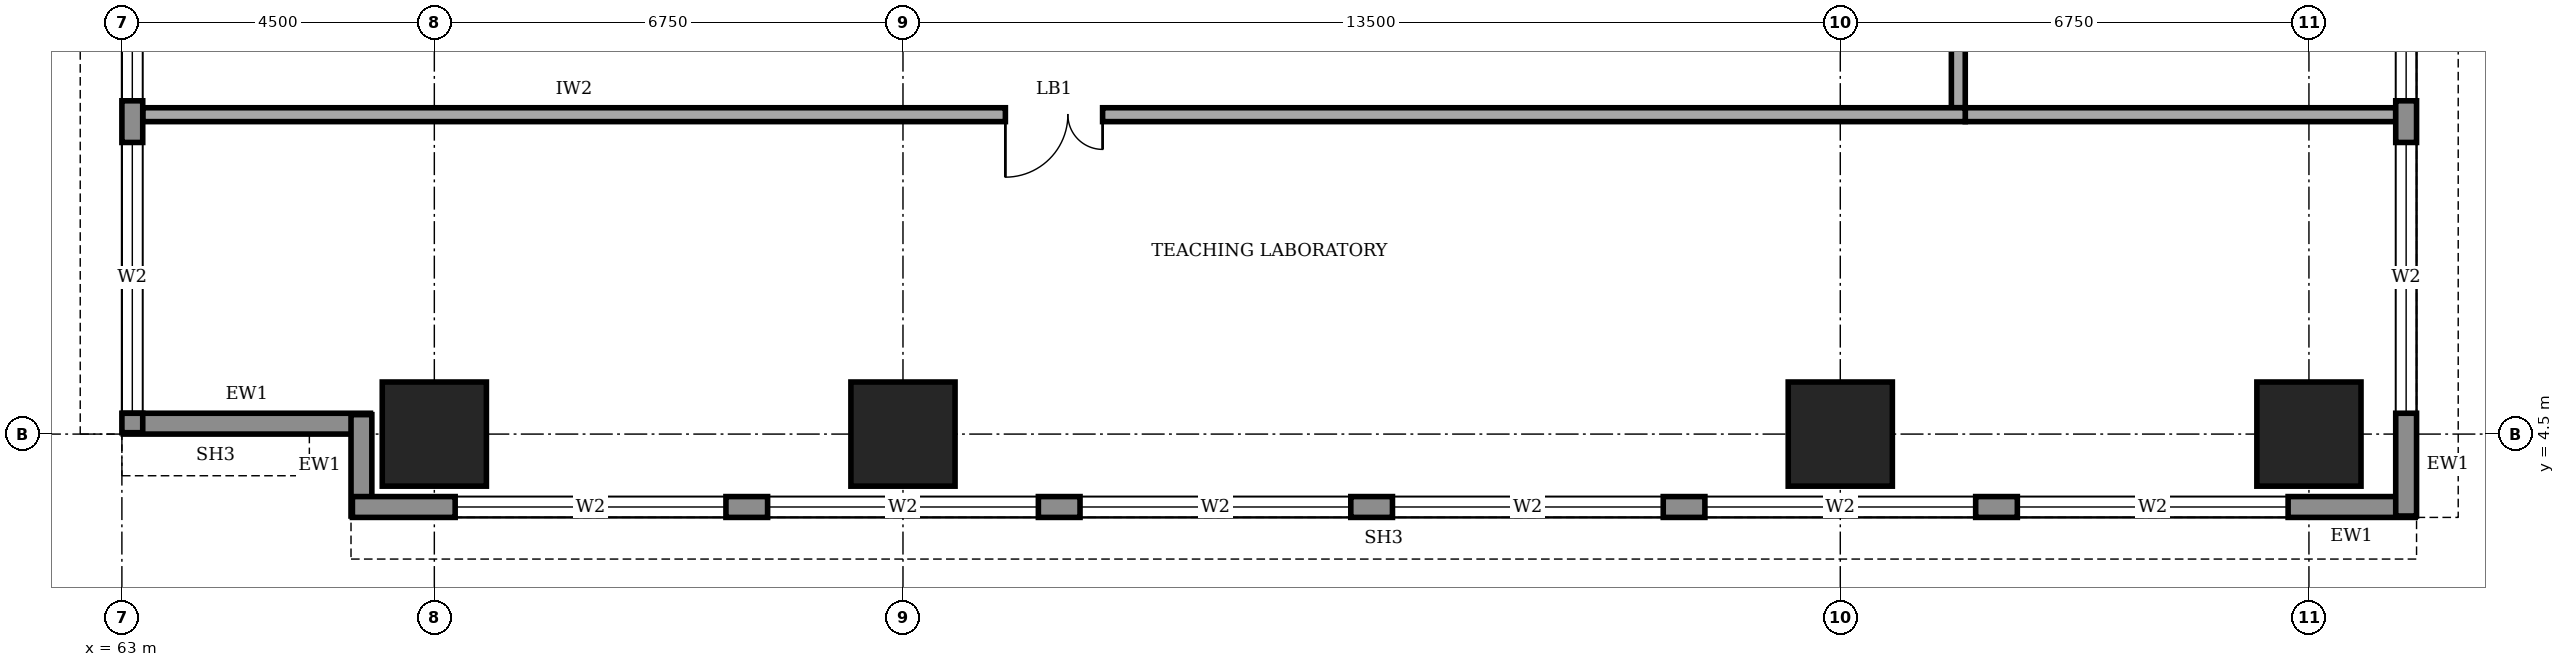
"""IFC4 building model, lengths in metres.
Left out: names, types, materials, properties, quantities, classifications, styles, units other than length and angle.
Written with IfcOpenShell. Run it as: python <this file> out.ifc"""

import sys

from ifc_helpers import new_model, si_unit, direction, frame, frame_2d, origin, origin_2d, place, context, subcontext, project, spatial, rectangle, extrude, element, fill, save


model = new_model("IFC4")
c1 = context("Model", 3, precision=1e-05, world=origin(), true_north=direction((0.0, 1.0)))
c2 = subcontext(c1, "Body", "Model", "MODEL_VIEW")
j1 = project(units=[si_unit("LENGTHUNIT", "METRE"), si_unit("PLANEANGLEUNIT", "RADIAN")], contexts=[c1])
p1 = place(None, origin())
s1 = spatial("IfcSite", under=j1, at=p1, CompositionType="ELEMENT")
p2 = place(p1, origin())
s2 = spatial("IfcBuilding", under=s1, at=p2, CompositionType="ELEMENT")
p3 = place(p2, frame((0.0, 0.0, 161.0)))
s3 = spatial("IfcBuildingStorey", under=s2, at=p3, CompositionType="ELEMENT", Elevation=161.0)
for number, where, z_axis, x_axis in (
    (1, (67.5, 4.5, 0.0), (0.0, 0.0, 1.0), (1.0, 0.0, 0.0)),
    (2, (74.25, 4.5, 0.0), (0.0, 0.0, 1.0), (1.0, 0.0, 0.0)),
    (3, (87.75, 4.5, 0.0), (0.0, 0.0, 1.0), (1.0, 0.0, 0.0)),
    (4, (94.5, 4.5, 0.0), (0.0, 0.0, 1.0), (1.0, 0.0, 0.0)),
):
    element("IfcColumn", number, at=place(p3, frame(where, z_axis=z_axis, x_axis=x_axis)), inside=s3, PredefinedType="COLUMN", context=c2, shape_type="SweptSolid", body=[
        extrude(rectangle(XDim=1.5, YDim=1.5, at=origin_2d()), origin(), (0.0, 0.0, 1.0), 4.0),
    ])
p4 = place(p3, frame((63.02, 4.65, 0.0), z_axis=(0.0, 0.0, 1.0), x_axis=(1.0, 0.0, 0.0)))
e5 = element("IfcWall", 5, at=p4, inside=s3, PredefinedType="STANDARD", context=c2, shape_type="SweptSolid", body=[
    extrude(rectangle(XDim=3.56, YDim=0.3, at=frame_2d((1.78, 0.0))), origin(), (0.0, 0.0, 1.0), 2.85),
])
p5 = place(p3, frame((66.45, 4.78, 0.0), z_axis=(0.0, 0.0, 1.0), x_axis=(0.0, -1.0, 0.0)))
e6 = element("IfcWall", 6, at=p5, inside=s3, PredefinedType="STANDARD", context=c2, shape_type="SweptSolid", body=[
    extrude(rectangle(XDim=1.46, YDim=0.3, at=frame_2d((0.73, 0.0))), origin(), (0.0, 0.0, 1.0), 3.75),
])
p6 = place(p3, frame((66.32, 3.45, 0.0), z_axis=(0.0, 0.0, 1.0), x_axis=(1.0, 0.0, 0.0)))
e7 = element("IfcWall", 7, at=p6, inside=s3, PredefinedType="STANDARD", context=c2, shape_type="SweptSolid", body=[
    extrude(rectangle(XDim=29.71, YDim=0.3, at=frame_2d((14.855, 0.0))), origin(), (0.0, 0.0, 1.0), 3.75),
])
p7 = place(p6, frame((1.48, 0.0, 0.6)))
e8 = element("IfcOpeningElement", 8, at=p7, cuts=e7, PredefinedType="OPENING", context=c2, shape_type="SweptSolid", body=[
    extrude(rectangle(XDim=3.9, YDim=2.6, at=frame_2d((1.95, 1.3))), frame((0.0, 0.16, 0.0), z_axis=(0.0, -1.0, 0.0), x_axis=(1.0, 0.0, 0.0)), (0.0, 0.0, 1.0), 0.32),
])
p8 = place(p6, frame((5.98, 0.0, 0.6)))
e9 = element("IfcOpeningElement", 9, at=p8, cuts=e7, PredefinedType="OPENING", context=c2, shape_type="SweptSolid", body=[
    extrude(rectangle(XDim=3.9, YDim=2.6, at=frame_2d((1.95, 1.3))), frame((0.0, 0.16, 0.0), z_axis=(0.0, -1.0, 0.0), x_axis=(1.0, 0.0, 0.0)), (0.0, 0.0, 1.0), 0.32),
])
p9 = place(p6, frame((10.48, 0.0, 0.6)))
e10 = element("IfcOpeningElement", 10, at=p9, cuts=e7, PredefinedType="OPENING", context=c2, shape_type="SweptSolid", body=[
    extrude(rectangle(XDim=3.9, YDim=2.6, at=frame_2d((1.95, 1.3))), frame((0.0, 0.16, 0.0), z_axis=(0.0, -1.0, 0.0), x_axis=(1.0, 0.0, 0.0)), (0.0, 0.0, 1.0), 0.32),
])
p10 = place(p6, frame((14.98, 0.0, 0.6)))
e11 = element("IfcOpeningElement", 11, at=p10, cuts=e7, PredefinedType="OPENING", context=c2, shape_type="SweptSolid", body=[
    extrude(rectangle(XDim=3.9, YDim=2.6, at=frame_2d((1.95, 1.3))), frame((0.0, 0.16, 0.0), z_axis=(0.0, -1.0, 0.0), x_axis=(1.0, 0.0, 0.0)), (0.0, 0.0, 1.0), 0.32),
])
p11 = place(p6, frame((19.48, 0.0, 0.6)))
e12 = element("IfcOpeningElement", 12, at=p11, cuts=e7, PredefinedType="OPENING", context=c2, shape_type="SweptSolid", body=[
    extrude(rectangle(XDim=3.9, YDim=2.6, at=frame_2d((1.95, 1.3))), frame((0.0, 0.16, 0.0), z_axis=(0.0, -1.0, 0.0), x_axis=(1.0, 0.0, 0.0)), (0.0, 0.0, 1.0), 0.32),
])
p12 = place(p6, frame((23.98, 0.0, 0.6)))
e13 = element("IfcOpeningElement", 13, at=p12, cuts=e7, PredefinedType="OPENING", context=c2, shape_type="SweptSolid", body=[
    extrude(rectangle(XDim=3.9, YDim=2.6, at=frame_2d((1.95, 1.3))), frame((0.0, 0.16, 0.0), z_axis=(0.0, -1.0, 0.0), x_axis=(1.0, 0.0, 0.0)), (0.0, 0.0, 1.0), 0.32),
])
p13 = place(p3, frame((95.9, 3.32, 0.0), z_axis=(0.0, 0.0, 1.0), x_axis=(0.0, 1.0, 0.0)))
e14 = element("IfcWall", 14, at=p13, inside=s3, PredefinedType="STANDARD", context=c2, shape_type="SweptSolid", body=[
    extrude(rectangle(XDim=33.86, YDim=0.3, at=frame_2d((16.93, 0.0))), origin(), (0.0, 0.0, 1.0), 3.75),
])
p14 = place(p13, frame((1.48, 0.0, 0.6)))
e15 = element("IfcOpeningElement", 15, at=p14, cuts=e14, PredefinedType="OPENING", context=c2, shape_type="SweptSolid", body=[
    extrude(rectangle(XDim=3.9, YDim=2.6, at=frame_2d((1.95, 1.3))), frame((0.0, 0.16, 0.0), z_axis=(0.0, -1.0, 0.0), x_axis=(1.0, 0.0, 0.0)), (0.0, 0.0, 1.0), 0.32),
])
p15 = place(p13, frame((5.98, 0.0, 0.6)))
e16 = element("IfcOpeningElement", 16, at=p15, cuts=e14, PredefinedType="OPENING", context=c2, shape_type="SweptSolid", body=[
    extrude(rectangle(XDim=3.9, YDim=2.6, at=frame_2d((1.95, 1.3))), frame((0.0, 0.16, 0.0), z_axis=(0.0, -1.0, 0.0), x_axis=(1.0, 0.0, 0.0)), (0.0, 0.0, 1.0), 0.32),
])
p16 = place(p13, frame((10.48, 0.0, 0.6)))
e17 = element("IfcOpeningElement", 17, at=p16, cuts=e14, PredefinedType="OPENING", context=c2, shape_type="SweptSolid", body=[
    extrude(rectangle(XDim=3.9, YDim=2.6, at=frame_2d((1.95, 1.3))), frame((0.0, 0.16, 0.0), z_axis=(0.0, -1.0, 0.0), x_axis=(1.0, 0.0, 0.0)), (0.0, 0.0, 1.0), 0.32),
])
p17 = place(p13, frame((14.98, 0.0, 0.6)))
e18 = element("IfcOpeningElement", 18, at=p17, cuts=e14, PredefinedType="OPENING", context=c2, shape_type="SweptSolid", body=[
    extrude(rectangle(XDim=3.9, YDim=2.6, at=frame_2d((1.95, 1.3))), frame((0.0, 0.16, 0.0), z_axis=(0.0, -1.0, 0.0), x_axis=(1.0, 0.0, 0.0)), (0.0, 0.0, 1.0), 0.32),
])
p18 = place(p13, frame((19.48, 0.0, 0.6)))
e19 = element("IfcOpeningElement", 19, at=p18, cuts=e14, PredefinedType="OPENING", context=c2, shape_type="SweptSolid", body=[
    extrude(rectangle(XDim=3.9, YDim=2.6, at=frame_2d((1.95, 1.3))), frame((0.0, 0.16, 0.0), z_axis=(0.0, -1.0, 0.0), x_axis=(1.0, 0.0, 0.0)), (0.0, 0.0, 1.0), 0.32),
])
p19 = place(p13, frame((23.98, 0.0, 0.6)))
e20 = element("IfcOpeningElement", 20, at=p19, cuts=e14, PredefinedType="OPENING", context=c2, shape_type="SweptSolid", body=[
    extrude(rectangle(XDim=3.9, YDim=2.6, at=frame_2d((1.95, 1.3))), frame((0.0, 0.16, 0.0), z_axis=(0.0, -1.0, 0.0), x_axis=(1.0, 0.0, 0.0)), (0.0, 0.0, 1.0), 0.32),
])
p20 = place(p13, frame((28.48, 0.0, 0.6)))
e21 = element("IfcOpeningElement", 21, at=p20, cuts=e14, PredefinedType="OPENING", context=c2, shape_type="SweptSolid", body=[
    extrude(rectangle(XDim=3.9, YDim=2.6, at=frame_2d((1.95, 1.3))), frame((0.0, 0.16, 0.0), z_axis=(0.0, -1.0, 0.0), x_axis=(1.0, 0.0, 0.0)), (0.0, 0.0, 1.0), 0.32),
])
p21 = place(p3, frame((63.15, 35.98, 0.0), z_axis=(0.0, 0.0, 1.0), x_axis=(0.0, -1.0, 0.0)))
e22 = element("IfcWall", 22, at=p21, inside=s3, PredefinedType="STANDARD", context=c2, shape_type="SweptSolid", body=[
    extrude(rectangle(XDim=31.46, YDim=0.3, at=frame_2d((15.73, 0.0))), origin(), (0.0, 0.0, 1.0), 3.75),
])
p22 = place(p21, frame((27.28, 0.0, 0.6)))
e23 = element("IfcOpeningElement", 23, at=p22, cuts=e22, PredefinedType="OPENING", context=c2, shape_type="SweptSolid", body=[
    extrude(rectangle(XDim=3.9, YDim=2.6, at=frame_2d((1.95, 1.3))), frame((0.0, 0.16, 0.0), z_axis=(0.0, -1.0, 0.0), x_axis=(1.0, 0.0, 0.0)), (0.0, 0.0, 1.0), 0.32),
])
p23 = place(p21, frame((22.78, 0.0, 0.6)))
e24 = element("IfcOpeningElement", 24, at=p23, cuts=e22, PredefinedType="OPENING", context=c2, shape_type="SweptSolid", body=[
    extrude(rectangle(XDim=3.9, YDim=2.6, at=frame_2d((1.95, 1.3))), frame((0.0, 0.16, 0.0), z_axis=(0.0, -1.0, 0.0), x_axis=(1.0, 0.0, 0.0)), (0.0, 0.0, 1.0), 0.32),
])
p24 = place(p21, frame((18.28, 0.0, 0.6)))
e25 = element("IfcOpeningElement", 25, at=p24, cuts=e22, PredefinedType="OPENING", context=c2, shape_type="SweptSolid", body=[
    extrude(rectangle(XDim=3.9, YDim=2.6, at=frame_2d((1.95, 1.3))), frame((0.0, 0.16, 0.0), z_axis=(0.0, -1.0, 0.0), x_axis=(1.0, 0.0, 0.0)), (0.0, 0.0, 1.0), 0.32),
])
p25 = place(p21, frame((13.78, 0.0, 0.6)))
e26 = element("IfcOpeningElement", 26, at=p25, cuts=e22, PredefinedType="OPENING", context=c2, shape_type="SweptSolid", body=[
    extrude(rectangle(XDim=3.9, YDim=2.6, at=frame_2d((1.95, 1.3))), frame((0.0, 0.16, 0.0), z_axis=(0.0, -1.0, 0.0), x_axis=(1.0, 0.0, 0.0)), (0.0, 0.0, 1.0), 0.32),
])
p26 = place(p21, frame((9.28, 0.0, 0.6)))
e27 = element("IfcOpeningElement", 27, at=p26, cuts=e22, PredefinedType="OPENING", context=c2, shape_type="SweptSolid", body=[
    extrude(rectangle(XDim=3.9, YDim=2.6, at=frame_2d((1.95, 1.3))), frame((0.0, 0.16, 0.0), z_axis=(0.0, -1.0, 0.0), x_axis=(1.0, 0.0, 0.0)), (0.0, 0.0, 1.0), 0.32),
])
p27 = place(p21, frame((4.78, 0.0, 0.6)))
e28 = element("IfcOpeningElement", 28, at=p27, cuts=e22, PredefinedType="OPENING", context=c2, shape_type="SweptSolid", body=[
    extrude(rectangle(XDim=3.9, YDim=2.6, at=frame_2d((1.95, 1.3))), frame((0.0, 0.16, 0.0), z_axis=(0.0, -1.0, 0.0), x_axis=(1.0, 0.0, 0.0)), (0.0, 0.0, 1.0), 0.32),
])
p28 = place(p3, frame((63.3, 9.1, 0.0), z_axis=(0.0, 0.0, 1.0), x_axis=(1.0, 0.0, 0.0)))
e29 = element("IfcWall", 29, at=p28, inside=s3, PredefinedType="SOLIDWALL", context=c2, shape_type="SweptSolid", body=[
    extrude(rectangle(XDim=26.25, YDim=0.2, at=frame_2d((13.125, 0.0))), origin(), (0.0, 0.0, 1.0), 3.75),
])
p29 = place(p28, frame((12.425, 0.0, 0.0)))
e30 = element("IfcOpeningElement", 30, at=p29, cuts=e29, PredefinedType="OPENING", context=c2, shape_type="SweptSolid", body=[
    extrude(rectangle(XDim=1.4, YDim=2.1, at=frame_2d((0.7, 1.05))), frame((0.0, 0.11, 0.0), z_axis=(0.0, -1.0, 0.0), x_axis=(1.0, 0.0, 0.0)), (0.0, 0.0, 1.0), 0.22),
])
p30 = place(p3, frame((89.45, 9.2, 0.0), z_axis=(0.0, 0.0, 1.0), x_axis=(0.0, 1.0, 0.0)))
e31 = element("IfcWall", 31, at=p30, inside=s3, PredefinedType="SOLIDWALL", context=c2, shape_type="SweptSolid", body=[
    extrude(rectangle(XDim=23.05, YDim=0.2, at=frame_2d((11.525, 0.0))), origin(), (0.0, 0.0, 1.0), 3.75),
])
p31 = place(p30, frame((1.55, 0.0, 0.0)))
e32 = element("IfcOpeningElement", 32, at=p31, cuts=e31, PredefinedType="OPENING", context=c2, shape_type="SweptSolid", body=[
    extrude(rectangle(XDim=1.0, YDim=2.1, at=frame_2d((0.5, 1.05))), frame((0.0, 0.11, 0.0), z_axis=(0.0, -1.0, 0.0), x_axis=(1.0, 0.0, 0.0)), (0.0, 0.0, 1.0), 0.22),
])
p32 = place(p30, frame((5.75, 0.0, 0.0)))
e33 = element("IfcOpeningElement", 33, at=p32, cuts=e31, PredefinedType="OPENING", context=c2, shape_type="SweptSolid", body=[
    extrude(rectangle(XDim=0.9, YDim=2.1, at=frame_2d((0.45, 1.05))), frame((0.0, 0.11, 0.0), z_axis=(0.0, -1.0, 0.0), x_axis=(1.0, 0.0, 0.0)), (0.0, 0.0, 1.0), 0.22),
])
p33 = place(p30, frame((8.75, 0.0, 0.0)))
e34 = element("IfcOpeningElement", 34, at=p33, cuts=e31, PredefinedType="OPENING", context=c2, shape_type="SweptSolid", body=[
    extrude(rectangle(XDim=0.9, YDim=2.1, at=frame_2d((0.45, 1.05))), frame((0.0, 0.11, 0.0), z_axis=(0.0, -1.0, 0.0), x_axis=(1.0, 0.0, 0.0)), (0.0, 0.0, 1.0), 0.22),
])
p34 = place(p30, frame((13.6, 0.0, 0.0)))
e35 = element("IfcOpeningElement", 35, at=p34, cuts=e31, PredefinedType="OPENING", context=c2, shape_type="SweptSolid", body=[
    extrude(rectangle(XDim=0.9, YDim=2.1, at=frame_2d((0.45, 1.05))), frame((0.0, 0.11, 0.0), z_axis=(0.0, -1.0, 0.0), x_axis=(1.0, 0.0, 0.0)), (0.0, 0.0, 1.0), 0.22),
])
p35 = place(p30, frame((16.3, 0.0, 0.0)))
e36 = element("IfcOpeningElement", 36, at=p35, cuts=e31, PredefinedType="OPENING", context=c2, shape_type="SweptSolid", body=[
    extrude(rectangle(XDim=1.0, YDim=2.1, at=frame_2d((0.5, 1.05))), frame((0.0, 0.11, 0.0), z_axis=(0.0, -1.0, 0.0), x_axis=(1.0, 0.0, 0.0)), (0.0, 0.0, 1.0), 0.22),
])
p36 = place(p30, frame((10.8, 0.0, 0.0)))
e37 = element("IfcOpeningElement", 37, at=p36, cuts=e31, PredefinedType="OPENING", context=c2, shape_type="SweptSolid", body=[
    extrude(rectangle(XDim=1.0, YDim=2.1, at=frame_2d((0.5, 1.05))), frame((0.0, 0.11, 0.0), z_axis=(0.0, -1.0, 0.0), x_axis=(1.0, 0.0, 0.0)), (0.0, 0.0, 1.0), 0.22),
])
p37 = place(p30, frame((19.925, 0.0, 0.0)))
e38 = element("IfcOpeningElement", 38, at=p37, cuts=e31, PredefinedType="OPENING", context=c2, shape_type="SweptSolid", body=[
    extrude(rectangle(XDim=1.0, YDim=2.1, at=frame_2d((0.5, 1.05))), frame((0.0, 0.11, 0.0), z_axis=(0.0, -1.0, 0.0), x_axis=(1.0, 0.0, 0.0)), (0.0, 0.0, 1.0), 0.22),
])
p38 = place(p3, frame((89.55, 9.1, 0.0), z_axis=(0.0, 0.0, 1.0), x_axis=(1.0, 0.0, 0.0)))
e39 = element("IfcWall", 39, at=p38, inside=s3, PredefinedType="SOLIDWALL", context=c2, shape_type="SweptSolid", body=[
    extrude(rectangle(XDim=6.2, YDim=0.2, at=frame_2d((3.1, 0.0))), origin(), (0.0, 0.0, 1.0), 3.75),
])
p39 = place(p7, origin())
e40 = element("IfcWindow", 40, at=p39, inside=s3, PartitioningType="SINGLE_PANEL", PredefinedType="WINDOW", context=c2, shape_type="SweptSolid", body=[
    extrude(rectangle(XDim=3.9, YDim=2.6, at=frame_2d((1.95, 1.3))), frame((0.0, 0.03, 0.0), z_axis=(0.0, -1.0, 0.0), x_axis=(1.0, 0.0, 0.0)), (0.0, 0.0, 1.0), 0.06),
])
fill(e8, e40)
p40 = place(p8, origin())
e41 = element("IfcWindow", 41, at=p40, inside=s3, PartitioningType="SINGLE_PANEL", PredefinedType="WINDOW", context=c2, shape_type="SweptSolid", body=[
    extrude(rectangle(XDim=3.9, YDim=2.6, at=frame_2d((1.95, 1.3))), frame((0.0, 0.03, 0.0), z_axis=(0.0, -1.0, 0.0), x_axis=(1.0, 0.0, 0.0)), (0.0, 0.0, 1.0), 0.06),
])
fill(e9, e41)
p41 = place(p9, origin())
e42 = element("IfcWindow", 42, at=p41, inside=s3, PartitioningType="SINGLE_PANEL", PredefinedType="WINDOW", context=c2, shape_type="SweptSolid", body=[
    extrude(rectangle(XDim=3.9, YDim=2.6, at=frame_2d((1.95, 1.3))), frame((0.0, 0.03, 0.0), z_axis=(0.0, -1.0, 0.0), x_axis=(1.0, 0.0, 0.0)), (0.0, 0.0, 1.0), 0.06),
])
fill(e10, e42)
p42 = place(p10, origin())
e43 = element("IfcWindow", 43, at=p42, inside=s3, PartitioningType="SINGLE_PANEL", PredefinedType="WINDOW", context=c2, shape_type="SweptSolid", body=[
    extrude(rectangle(XDim=3.9, YDim=2.6, at=frame_2d((1.95, 1.3))), frame((0.0, 0.03, 0.0), z_axis=(0.0, -1.0, 0.0), x_axis=(1.0, 0.0, 0.0)), (0.0, 0.0, 1.0), 0.06),
])
fill(e11, e43)
p43 = place(p11, origin())
e44 = element("IfcWindow", 44, at=p43, inside=s3, PartitioningType="SINGLE_PANEL", PredefinedType="WINDOW", context=c2, shape_type="SweptSolid", body=[
    extrude(rectangle(XDim=3.9, YDim=2.6, at=frame_2d((1.95, 1.3))), frame((0.0, 0.03, 0.0), z_axis=(0.0, -1.0, 0.0), x_axis=(1.0, 0.0, 0.0)), (0.0, 0.0, 1.0), 0.06),
])
fill(e12, e44)
p44 = place(p12, origin())
e45 = element("IfcWindow", 45, at=p44, inside=s3, PartitioningType="SINGLE_PANEL", PredefinedType="WINDOW", context=c2, shape_type="SweptSolid", body=[
    extrude(rectangle(XDim=3.9, YDim=2.6, at=frame_2d((1.95, 1.3))), frame((0.0, 0.03, 0.0), z_axis=(0.0, -1.0, 0.0), x_axis=(1.0, 0.0, 0.0)), (0.0, 0.0, 1.0), 0.06),
])
fill(e13, e45)
p45 = place(p14, origin())
e46 = element("IfcWindow", 46, at=p45, inside=s3, PartitioningType="SINGLE_PANEL", PredefinedType="WINDOW", context=c2, shape_type="SweptSolid", body=[
    extrude(rectangle(XDim=3.9, YDim=2.6, at=frame_2d((1.95, 1.3))), frame((0.0, 0.03, 0.0), z_axis=(0.0, -1.0, 0.0), x_axis=(1.0, 0.0, 0.0)), (0.0, 0.0, 1.0), 0.06),
])
fill(e15, e46)
p46 = place(p15, origin())
e47 = element("IfcWindow", 47, at=p46, inside=s3, PartitioningType="SINGLE_PANEL", PredefinedType="WINDOW", context=c2, shape_type="SweptSolid", body=[
    extrude(rectangle(XDim=3.9, YDim=2.6, at=frame_2d((1.95, 1.3))), frame((0.0, 0.03, 0.0), z_axis=(0.0, -1.0, 0.0), x_axis=(1.0, 0.0, 0.0)), (0.0, 0.0, 1.0), 0.06),
])
fill(e16, e47)
p47 = place(p22, origin())
e48 = element("IfcWindow", 48, at=p47, inside=s3, PartitioningType="SINGLE_PANEL", PredefinedType="WINDOW", context=c2, shape_type="SweptSolid", body=[
    extrude(rectangle(XDim=3.9, YDim=2.6, at=frame_2d((1.95, 1.3))), frame((0.0, 0.03, 0.0), z_axis=(0.0, -1.0, 0.0), x_axis=(1.0, 0.0, 0.0)), (0.0, 0.0, 1.0), 0.06),
])
fill(e23, e48)
p48 = place(p23, origin())
e49 = element("IfcWindow", 49, at=p48, inside=s3, PartitioningType="SINGLE_PANEL", PredefinedType="WINDOW", context=c2, shape_type="SweptSolid", body=[
    extrude(rectangle(XDim=3.9, YDim=2.6, at=frame_2d((1.95, 1.3))), frame((0.0, 0.03, 0.0), z_axis=(0.0, -1.0, 0.0), x_axis=(1.0, 0.0, 0.0)), (0.0, 0.0, 1.0), 0.06),
])
fill(e24, e49)
p49 = place(p29, frame((1.4, 0.0, 0.0), z_axis=(0.0, 0.0, 1.0), x_axis=(-1.0, 0.0, 0.0)))
e50 = element("IfcDoor", 50, at=p49, inside=s3, OperationType="DOUBLE_DOOR_SINGLE_SWING", PredefinedType="DOOR", context=c2, shape_type="SweptSolid", body=[
    extrude(rectangle(XDim=1.4, YDim=2.1, at=frame_2d((0.7, 1.05))), frame((0.0, 0.025, 0.0), z_axis=(0.0, -1.0, 0.0), x_axis=(1.0, 0.0, 0.0)), (0.0, 0.0, 1.0), 0.05),
])
fill(e30, e50)
save(model, sys.argv[1])
